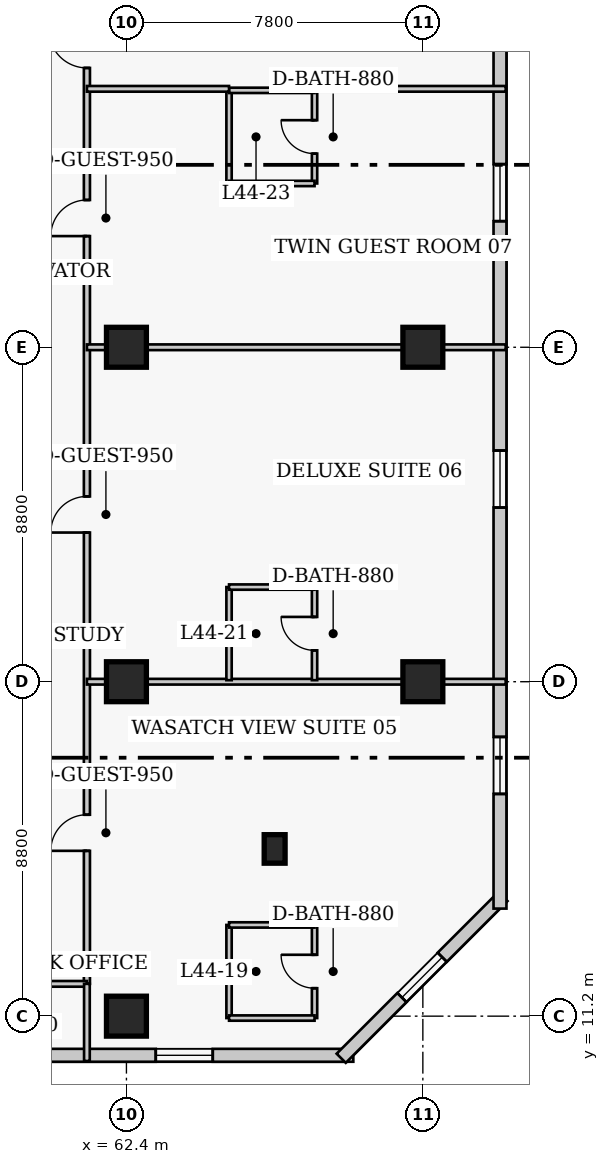
"""IFC4 building model, lengths in metres.
Left out: names, types, materials, properties, quantities, classifications, styles, units other than length and angle.
Written with IfcOpenShell. Run it as: python <this file> out.ifc"""

import sys

from ifc_helpers import new_model, si_unit, direction, frame, frame_2d, origin, origin_2d, place, context, subcontext, project, spatial, rectangle, extrude, element, fill, save


model = new_model("IFC4")
c1 = context("Model", 3, precision=1e-05, world=origin(), true_north=direction((0.0, 1.0)))
c2 = subcontext(c1, "Body", "Model", "MODEL_VIEW")
j1 = project(units=[si_unit("LENGTHUNIT", "METRE"), si_unit("PLANEANGLEUNIT", "RADIAN")], contexts=[c1])
p1 = place(None, origin())
s1 = spatial("IfcSite", under=j1, at=p1, CompositionType="ELEMENT")
p2 = place(p1, origin())
s2 = spatial("IfcBuilding", under=s1, at=p2, CompositionType="ELEMENT")
p3 = place(p2, frame((0.0, 0.0, 176.4)))
s3 = spatial("IfcBuildingStorey", under=s2, at=p3, CompositionType="ELEMENT", Elevation=176.4)
for number, where, z_axis, x_axis in (
    (1, (62.4, 11.2, 0.0), (0.0, 0.0, 1.0), (1.0, 0.0, 0.0)),
    (2, (62.4, 20.0, 0.0), (0.0, 0.0, 1.0), (1.0, 0.0, 0.0)),
    (3, (62.4, 28.8, 0.0), (0.0, 0.0, 1.0), (1.0, 0.0, 0.0)),
    (4, (70.2, 20.0, 0.0), (0.0, 0.0, 1.0), (1.0, 0.0, 0.0)),
    (5, (70.2, 28.8, 0.0), (0.0, 0.0, 1.0), (1.0, 0.0, 0.0)),
):
    element("IfcColumn", number, at=place(p3, frame(where, z_axis=z_axis, x_axis=x_axis)), inside=s3, PredefinedType="COLUMN", context=c2, shape_type="SweptSolid", body=[
        extrude(rectangle(XDim=1.05, YDim=1.05, at=origin_2d()), origin(), (0.0, 0.0, 1.0), 3.8),
    ])
p4 = place(p3, frame((66.3, 15.6, 0.0), z_axis=(0.0, 0.0, 1.0), x_axis=(1.0, 0.0, 0.0)))
e6 = element("IfcColumn", 6, at=p4, inside=s3, PredefinedType="PILASTER", context=c2, shape_type="SweptSolid", body=[
    extrude(rectangle(XDim=0.55, YDim=0.75, at=origin_2d()), origin(), (0.0, 0.0, 1.0), 3.8),
])
p5 = place(p3, frame((41.68, 10.17, 0.0), z_axis=(0.0, 0.0, 1.0), x_axis=(1.0, 0.0, 0.0)))
e7 = element("IfcWall", 7, at=p5, inside=s3, PredefinedType="SOLIDWALL", context=c2, shape_type="SweptSolid", body=[
    extrude(rectangle(XDim=26.69, YDim=0.34, at=frame_2d((13.345, 0.0))), origin(), (0.0, 0.0, 1.0), 3.55),
])
p6 = place(p5, frame((2.548, 0.0, 0.85)))
e8 = element("IfcOpeningElement", 8, at=p6, cuts=e7, PredefinedType="OPENING", context=c2, shape_type="SweptSolid", body=[
    extrude(rectangle(XDim=1.5, YDim=1.75, at=frame_2d((0.75, 0.875))), frame((0.0, 0.18, 0.0), z_axis=(0.0, -1.0, 0.0), x_axis=(1.0, 0.0, 0.0)), (0.0, 0.0, 1.0), 0.36),
])
p7 = place(p5, frame((13.745, 0.0, 0.85)))
e9 = element("IfcOpeningElement", 9, at=p7, cuts=e7, PredefinedType="OPENING", context=c2, shape_type="SweptSolid", body=[
    extrude(rectangle(XDim=1.5, YDim=1.75, at=frame_2d((0.75, 0.875))), frame((0.0, 0.18, 0.0), z_axis=(0.0, -1.0, 0.0), x_axis=(1.0, 0.0, 0.0)), (0.0, 0.0, 1.0), 0.36),
])
p8 = place(p5, frame((21.492, 0.0, 0.85)))
e10 = element("IfcOpeningElement", 10, at=p8, cuts=e7, PredefinedType="OPENING", context=c2, shape_type="SweptSolid", body=[
    extrude(rectangle(XDim=1.5, YDim=1.75, at=frame_2d((0.75, 0.875))), frame((0.0, 0.18, 0.0), z_axis=(0.0, -1.0, 0.0), x_axis=(1.0, 0.0, 0.0)), (0.0, 0.0, 1.0), 0.36),
])
p9 = place(p3, frame((68.052, 10.092, 0.0), z_axis=(0.0, 0.0, 1.0), x_axis=(0.707106781187, 0.707106781187, 0.0)))
e11 = element("IfcWall", 11, at=p9, inside=s3, PredefinedType="SOLIDWALL", context=c2, shape_type="SweptSolid", body=[
    extrude(rectangle(XDim=6.02, YDim=0.34, at=frame_2d((3.01, 0.0))), origin(), (0.0, 0.0, 1.0), 3.55),
])
p10 = place(p9, frame((2.26, 0.0, 0.85)))
e12 = element("IfcOpeningElement", 12, at=p10, cuts=e11, PredefinedType="OPENING", context=c2, shape_type="SweptSolid", body=[
    extrude(rectangle(XDim=1.5, YDim=1.75, at=frame_2d((0.75, 0.875))), frame((0.0, 0.18, 0.0), z_axis=(0.0, -1.0, 0.0), x_axis=(1.0, 0.0, 0.0)), (0.0, 0.0, 1.0), 0.36),
])
p11 = place(p3, frame((72.23, 14.03, 0.0), z_axis=(0.0, 0.0, 1.0), x_axis=(0.0, 1.0, 0.0)))
e13 = element("IfcWall", 13, at=p11, inside=s3, PredefinedType="SOLIDWALL", context=c2, shape_type="SweptSolid", body=[
    extrude(rectangle(XDim=30.14, YDim=0.34, at=frame_2d((15.07, 0.0))), origin(), (0.0, 0.0, 1.0), 3.55),
])
p12 = place(p11, frame((3.018, 0.0, 0.85)))
e14 = element("IfcOpeningElement", 14, at=p12, cuts=e13, PredefinedType="OPENING", context=c2, shape_type="SweptSolid", body=[
    extrude(rectangle(XDim=1.5, YDim=1.75, at=frame_2d((0.75, 0.875))), frame((0.0, 0.18, 0.0), z_axis=(0.0, -1.0, 0.0), x_axis=(1.0, 0.0, 0.0)), (0.0, 0.0, 1.0), 0.36),
])
p13 = place(p11, frame((10.552, 0.0, 0.85)))
e15 = element("IfcOpeningElement", 15, at=p13, cuts=e13, PredefinedType="OPENING", context=c2, shape_type="SweptSolid", body=[
    extrude(rectangle(XDim=1.5, YDim=1.75, at=frame_2d((0.75, 0.875))), frame((0.0, 0.18, 0.0), z_axis=(0.0, -1.0, 0.0), x_axis=(1.0, 0.0, 0.0)), (0.0, 0.0, 1.0), 0.36),
])
p14 = place(p11, frame((18.087, 0.0, 0.85)))
e16 = element("IfcOpeningElement", 16, at=p14, cuts=e13, PredefinedType="OPENING", context=c2, shape_type="SweptSolid", body=[
    extrude(rectangle(XDim=1.5, YDim=1.75, at=frame_2d((0.75, 0.875))), frame((0.0, 0.18, 0.0), z_axis=(0.0, -1.0, 0.0), x_axis=(1.0, 0.0, 0.0)), (0.0, 0.0, 1.0), 0.36),
])
p15 = place(p11, frame((25.623, 0.0, 0.85)))
e17 = element("IfcOpeningElement", 17, at=p15, cuts=e13, PredefinedType="OPENING", context=c2, shape_type="SweptSolid", body=[
    extrude(rectangle(XDim=1.5, YDim=1.75, at=frame_2d((0.75, 0.875))), frame((0.0, 0.18, 0.0), z_axis=(0.0, -1.0, 0.0), x_axis=(1.0, 0.0, 0.0)), (0.0, 0.0, 1.0), 0.36),
])
p16 = place(p3, frame((61.36, 12.05, 0.0), z_axis=(0.0, 0.0, 1.0), x_axis=(0.0, 1.0, 0.0)))
e18 = element("IfcWall", 18, at=p16, inside=s3, PredefinedType="PARTITIONING", context=c2, shape_type="SweptSolid", body=[
    extrude(rectangle(XDim=28.6, YDim=0.16, at=frame_2d((14.3, 0.0))), origin(), (0.0, 0.0, 1.0), 3.55),
])
p17 = place(p16, frame((3.5, 0.0, 0.0)))
e19 = element("IfcOpeningElement", 19, at=p17, cuts=e18, PredefinedType="OPENING", context=c2, shape_type="SweptSolid", body=[
    extrude(rectangle(XDim=0.95, YDim=2.1, at=frame_2d((0.475, 1.05))), frame((0.0, 0.09, 0.0), z_axis=(0.0, -1.0, 0.0), x_axis=(1.0, 0.0, 0.0)), (0.0, 0.0, 1.0), 0.18),
])
p18 = place(p16, frame((11.875, 0.0, 0.0)))
e20 = element("IfcOpeningElement", 20, at=p18, cuts=e18, PredefinedType="OPENING", context=c2, shape_type="SweptSolid", body=[
    extrude(rectangle(XDim=0.95, YDim=2.1, at=frame_2d((0.475, 1.05))), frame((0.0, 0.09, 0.0), z_axis=(0.0, -1.0, 0.0), x_axis=(1.0, 0.0, 0.0)), (0.0, 0.0, 1.0), 0.18),
])
p19 = place(p16, frame((19.675, 0.0, 0.0)))
e21 = element("IfcOpeningElement", 21, at=p19, cuts=e18, PredefinedType="OPENING", context=c2, shape_type="SweptSolid", body=[
    extrude(rectangle(XDim=0.95, YDim=2.1, at=frame_2d((0.475, 1.05))), frame((0.0, 0.09, 0.0), z_axis=(0.0, -1.0, 0.0), x_axis=(1.0, 0.0, 0.0)), (0.0, 0.0, 1.0), 0.18),
])
p20 = place(p16, frame((24.1, 0.0, 0.0)))
e22 = element("IfcOpeningElement", 22, at=p20, cuts=e18, PredefinedType="OPENING", context=c2, shape_type="SweptSolid", body=[
    extrude(rectangle(XDim=1.0, YDim=2.15, at=frame_2d((0.5, 1.075))), frame((0.0, 0.09, 0.0), z_axis=(0.0, -1.0, 0.0), x_axis=(1.0, 0.0, 0.0)), (0.0, 0.0, 1.0), 0.18),
])
p21 = place(p3, frame((59.14, 12.05, 0.0), z_axis=(0.0, 0.0, 1.0), x_axis=(1.0, 0.0, 0.0)))
e23 = element("IfcWall", 23, at=p21, inside=s3, PredefinedType="PARTITIONING", context=c2, shape_type="SweptSolid", body=[
    extrude(rectangle(XDim=2.22, YDim=0.15, at=frame_2d((1.11, 0.0))), origin(), (0.0, 0.0, 1.0), 3.55),
])
p22 = place(p3, frame((61.36, 10.02, 0.0), z_axis=(0.0, 0.0, 1.0), x_axis=(0.0, 1.0, 0.0)))
e24 = element("IfcWall", 24, at=p22, inside=s3, PredefinedType="PARTITIONING", context=c2, shape_type="SweptSolid", body=[
    extrude(rectangle(XDim=2.03, YDim=0.15, at=frame_2d((1.015, 0.0))), origin(), (0.0, 0.0, 1.0), 3.55),
])
p23 = place(p3, frame((65.1, 11.15, 0.0), z_axis=(0.0, 0.0, 1.0), x_axis=(0.0, 1.0, 0.0)))
e25 = element("IfcWall", 25, at=p23, inside=s3, PredefinedType="PLUMBINGWALL", context=c2, shape_type="SweptSolid", body=[
    extrude(rectangle(XDim=2.45, YDim=0.14, at=frame_2d((1.225, 0.0))), origin(), (0.0, 0.0, 1.0), 3.55),
])
p24 = place(p3, frame((67.35, 11.15, 0.0), z_axis=(0.0, 0.0, 1.0), x_axis=(0.0, 1.0, 0.0)))
e26 = element("IfcWall", 26, at=p24, inside=s3, PredefinedType="PLUMBINGWALL", context=c2, shape_type="SweptSolid", body=[
    extrude(rectangle(XDim=2.45, YDim=0.14, at=frame_2d((1.225, 0.0))), origin(), (0.0, 0.0, 1.0), 3.55),
])
p25 = place(p24, frame((0.785, 0.0, 0.0)))
e27 = element("IfcOpeningElement", 27, at=p25, cuts=e26, PredefinedType="OPENING", context=c2, shape_type="SweptSolid", body=[
    extrude(rectangle(XDim=0.88, YDim=2.05, at=frame_2d((0.44, 1.025))), frame((0.0, 0.08, 0.0), z_axis=(0.0, -1.0, 0.0), x_axis=(1.0, 0.0, 0.0)), (0.0, 0.0, 1.0), 0.16),
])
for number, where, z_axis, x_axis in (
    (28, (65.1, 11.15, 0.0), (0.0, 0.0, 1.0), (1.0, 0.0, 0.0)),
    (29, (65.1, 13.6, 0.0), (0.0, 0.0, 1.0), (1.0, 0.0, 0.0)),
):
    element("IfcWall", number, at=place(p3, frame(where, z_axis=z_axis, x_axis=x_axis)), inside=s3, PredefinedType="PLUMBINGWALL", context=c2, shape_type="SweptSolid", body=[
        extrude(rectangle(XDim=2.25, YDim=0.14, at=frame_2d((1.125, 0.0))), origin(), (0.0, 0.0, 1.0), 3.55),
    ])
p26 = place(p3, frame((61.36, 20.0, 0.0), z_axis=(0.0, 0.0, 1.0), x_axis=(1.0, 0.0, 0.0)))
e30 = element("IfcWall", 30, at=p26, inside=s3, PredefinedType="PARTITIONING", context=c2, shape_type="SweptSolid", body=[
    extrude(rectangle(XDim=11.02, YDim=0.15, at=frame_2d((5.51, 0.0))), origin(), (0.0, 0.0, 1.0), 2.778),
])
p27 = place(p3, frame((65.1, 20.04, 0.0), z_axis=(0.0, 0.0, 1.0), x_axis=(0.0, 1.0, 0.0)))
e31 = element("IfcWall", 31, at=p27, inside=s3, PredefinedType="PLUMBINGWALL", context=c2, shape_type="SweptSolid", body=[
    extrude(rectangle(XDim=2.45, YDim=0.14, at=frame_2d((1.225, 0.0))), origin(), (0.0, 0.0, 1.0), 3.55),
])
p28 = place(p3, frame((67.35, 20.04, 0.0), z_axis=(0.0, 0.0, 1.0), x_axis=(0.0, 1.0, 0.0)))
e32 = element("IfcWall", 32, at=p28, inside=s3, PredefinedType="PLUMBINGWALL", context=c2, shape_type="SweptSolid", body=[
    extrude(rectangle(XDim=2.45, YDim=0.14, at=frame_2d((1.225, 0.0))), origin(), (0.0, 0.0, 1.0), 3.55),
])
p29 = place(p28, frame((0.785, 0.0, 0.0)))
e33 = element("IfcOpeningElement", 33, at=p29, cuts=e32, PredefinedType="OPENING", context=c2, shape_type="SweptSolid", body=[
    extrude(rectangle(XDim=0.88, YDim=2.05, at=frame_2d((0.44, 1.025))), frame((0.0, 0.08, 0.0), z_axis=(0.0, -1.0, 0.0), x_axis=(1.0, 0.0, 0.0)), (0.0, 0.0, 1.0), 0.16),
])
p30 = place(p3, frame((65.1, 22.49, 0.0), z_axis=(0.0, 0.0, 1.0), x_axis=(1.0, 0.0, 0.0)))
e34 = element("IfcWall", 34, at=p30, inside=s3, PredefinedType="PLUMBINGWALL", context=c2, shape_type="SweptSolid", body=[
    extrude(rectangle(XDim=2.25, YDim=0.14, at=frame_2d((1.125, 0.0))), origin(), (0.0, 0.0, 1.0), 3.55),
])
p31 = place(p3, frame((61.36, 28.8, 0.0), z_axis=(0.0, 0.0, 1.0), x_axis=(1.0, 0.0, 0.0)))
e35 = element("IfcWall", 35, at=p31, inside=s3, PredefinedType="PARTITIONING", context=c2, shape_type="SweptSolid", body=[
    extrude(rectangle(XDim=11.02, YDim=0.15, at=frame_2d((5.51, 0.0))), origin(), (0.0, 0.0, 1.0), 2.778),
])
p32 = place(p3, frame((65.1, 33.11, 0.0), z_axis=(0.0, 0.0, 1.0), x_axis=(0.0, 1.0, 0.0)))
e36 = element("IfcWall", 36, at=p32, inside=s3, PredefinedType="PLUMBINGWALL", context=c2, shape_type="SweptSolid", body=[
    extrude(rectangle(XDim=2.45, YDim=0.14, at=frame_2d((1.225, 0.0))), origin(), (0.0, 0.0, 1.0), 3.55),
])
p33 = place(p3, frame((67.35, 33.11, 0.0), z_axis=(0.0, 0.0, 1.0), x_axis=(0.0, 1.0, 0.0)))
e37 = element("IfcWall", 37, at=p33, inside=s3, PredefinedType="PLUMBINGWALL", context=c2, shape_type="SweptSolid", body=[
    extrude(rectangle(XDim=2.45, YDim=0.14, at=frame_2d((1.225, 0.0))), origin(), (0.0, 0.0, 1.0), 3.55),
])
p34 = place(p33, frame((0.785, 0.0, 0.0)))
e38 = element("IfcOpeningElement", 38, at=p34, cuts=e37, PredefinedType="OPENING", context=c2, shape_type="SweptSolid", body=[
    extrude(rectangle(XDim=0.88, YDim=2.05, at=frame_2d((0.44, 1.025))), frame((0.0, 0.08, 0.0), z_axis=(0.0, -1.0, 0.0), x_axis=(1.0, 0.0, 0.0)), (0.0, 0.0, 1.0), 0.16),
])
for number, where, z_axis, x_axis in (
    (39, (65.1, 33.11, 0.0), (0.0, 0.0, 1.0), (1.0, 0.0, 0.0)),
    (40, (65.1, 35.56, 0.0), (0.0, 0.0, 1.0), (1.0, 0.0, 0.0)),
):
    element("IfcWall", number, at=place(p3, frame(where, z_axis=z_axis, x_axis=x_axis)), inside=s3, PredefinedType="PLUMBINGWALL", context=c2, shape_type="SweptSolid", body=[
        extrude(rectangle(XDim=2.25, YDim=0.14, at=frame_2d((1.125, 0.0))), origin(), (0.0, 0.0, 1.0), 3.55),
    ])
p35 = place(p3, frame((61.36, 35.6, 0.0), z_axis=(0.0, 0.0, 1.0), x_axis=(1.0, 0.0, 0.0)))
e41 = element("IfcWall", 41, at=p35, inside=s3, PredefinedType="PARTITIONING", context=c2, shape_type="SweptSolid", body=[
    extrude(rectangle(XDim=3.74, YDim=0.15, at=frame_2d((1.87, 0.0))), origin(), (0.0, 0.0, 1.0), 3.55),
])
p36 = place(p3, frame((67.35, 35.6, 0.0), z_axis=(0.0, 0.0, 1.0), x_axis=(1.0, 0.0, 0.0)))
e42 = element("IfcWall", 42, at=p36, inside=s3, PredefinedType="PARTITIONING", context=c2, shape_type="SweptSolid", body=[
    extrude(rectangle(XDim=5.03, YDim=0.15, at=frame_2d((2.515, 0.0))), origin(), (0.0, 0.0, 1.0), 3.55),
])
p37 = place(p8, origin())
e43 = element("IfcWindow", 43, at=p37, inside=s3, PartitioningType="SINGLE_PANEL", PredefinedType="WINDOW", context=c2, shape_type="SweptSolid", body=[
    extrude(rectangle(XDim=1.5, YDim=1.75, at=frame_2d((0.75, 0.875))), frame((0.0, 0.03, 0.0), z_axis=(0.0, -1.0, 0.0), x_axis=(1.0, 0.0, 0.0)), (0.0, 0.0, 1.0), 0.06),
])
fill(e10, e43)
p38 = place(p10, origin())
e44 = element("IfcWindow", 44, at=p38, inside=s3, PartitioningType="SINGLE_PANEL", PredefinedType="WINDOW", context=c2, shape_type="SweptSolid", body=[
    extrude(rectangle(XDim=1.5, YDim=1.75, at=frame_2d((0.75, 0.875))), frame((0.0, 0.03, 0.0), z_axis=(0.0, -1.0, 0.0), x_axis=(1.0, 0.0, 0.0)), (0.0, 0.0, 1.0), 0.06),
])
fill(e12, e44)
p39 = place(p12, origin())
e45 = element("IfcWindow", 45, at=p39, inside=s3, PartitioningType="SINGLE_PANEL", PredefinedType="WINDOW", context=c2, shape_type="SweptSolid", body=[
    extrude(rectangle(XDim=1.5, YDim=1.75, at=frame_2d((0.75, 0.875))), frame((0.0, 0.03, 0.0), z_axis=(0.0, -1.0, 0.0), x_axis=(1.0, 0.0, 0.0)), (0.0, 0.0, 1.0), 0.06),
])
fill(e14, e45)
p40 = place(p13, origin())
e46 = element("IfcWindow", 46, at=p40, inside=s3, PartitioningType="SINGLE_PANEL", PredefinedType="WINDOW", context=c2, shape_type="SweptSolid", body=[
    extrude(rectangle(XDim=1.5, YDim=1.75, at=frame_2d((0.75, 0.875))), frame((0.0, 0.03, 0.0), z_axis=(0.0, -1.0, 0.0), x_axis=(1.0, 0.0, 0.0)), (0.0, 0.0, 1.0), 0.06),
])
fill(e15, e46)
p41 = place(p14, origin())
e47 = element("IfcWindow", 47, at=p41, inside=s3, PartitioningType="SINGLE_PANEL", PredefinedType="WINDOW", context=c2, shape_type="SweptSolid", body=[
    extrude(rectangle(XDim=1.5, YDim=1.75, at=frame_2d((0.75, 0.875))), frame((0.0, 0.03, 0.0), z_axis=(0.0, -1.0, 0.0), x_axis=(1.0, 0.0, 0.0)), (0.0, 0.0, 1.0), 0.06),
])
fill(e16, e47)
p42 = place(p25, origin())
e48 = element("IfcDoor", 48, at=p42, inside=s3, OperationType="SINGLE_SWING_RIGHT", PredefinedType="DOOR", context=c2, shape_type="SweptSolid", body=[
    extrude(rectangle(XDim=0.88, YDim=2.05, at=frame_2d((0.44, 1.025))), frame((0.0, 0.025, 0.0), z_axis=(0.0, -1.0, 0.0), x_axis=(1.0, 0.0, 0.0)), (0.0, 0.0, 1.0), 0.05),
])
fill(e27, e48)
p43 = place(p17, origin())
e49 = element("IfcDoor", 49, at=p43, inside=s3, OperationType="SINGLE_SWING_LEFT", PredefinedType="DOOR", context=c2, shape_type="SweptSolid", body=[
    extrude(rectangle(XDim=0.95, YDim=2.1, at=frame_2d((0.475, 1.05))), frame((0.0, 0.025, 0.0), z_axis=(0.0, -1.0, 0.0), x_axis=(1.0, 0.0, 0.0)), (0.0, 0.0, 1.0), 0.05),
])
fill(e19, e49)
p44 = place(p29, origin())
e50 = element("IfcDoor", 50, at=p44, inside=s3, OperationType="SINGLE_SWING_RIGHT", PredefinedType="DOOR", context=c2, shape_type="SweptSolid", body=[
    extrude(rectangle(XDim=0.88, YDim=2.05, at=frame_2d((0.44, 1.025))), frame((0.0, 0.025, 0.0), z_axis=(0.0, -1.0, 0.0), x_axis=(1.0, 0.0, 0.0)), (0.0, 0.0, 1.0), 0.05),
])
fill(e33, e50)
p45 = place(p18, origin())
e51 = element("IfcDoor", 51, at=p45, inside=s3, OperationType="SINGLE_SWING_LEFT", PredefinedType="DOOR", context=c2, shape_type="SweptSolid", body=[
    extrude(rectangle(XDim=0.95, YDim=2.1, at=frame_2d((0.475, 1.05))), frame((0.0, 0.025, 0.0), z_axis=(0.0, -1.0, 0.0), x_axis=(1.0, 0.0, 0.0)), (0.0, 0.0, 1.0), 0.05),
])
fill(e20, e51)
p46 = place(p34, origin())
e52 = element("IfcDoor", 52, at=p46, inside=s3, OperationType="SINGLE_SWING_RIGHT", PredefinedType="DOOR", context=c2, shape_type="SweptSolid", body=[
    extrude(rectangle(XDim=0.88, YDim=2.05, at=frame_2d((0.44, 1.025))), frame((0.0, 0.025, 0.0), z_axis=(0.0, -1.0, 0.0), x_axis=(1.0, 0.0, 0.0)), (0.0, 0.0, 1.0), 0.05),
])
fill(e38, e52)
p47 = place(p19, origin())
e53 = element("IfcDoor", 53, at=p47, inside=s3, OperationType="SINGLE_SWING_LEFT", PredefinedType="DOOR", context=c2, shape_type="SweptSolid", body=[
    extrude(rectangle(XDim=0.95, YDim=2.1, at=frame_2d((0.475, 1.05))), frame((0.0, 0.025, 0.0), z_axis=(0.0, -1.0, 0.0), x_axis=(1.0, 0.0, 0.0)), (0.0, 0.0, 1.0), 0.05),
])
fill(e21, e53)
p48 = place(p20, origin())
e54 = element("IfcDoor", 54, at=p48, inside=s3, OperationType="SINGLE_SWING_RIGHT", PredefinedType="DOOR", context=c2, shape_type="SweptSolid", body=[
    extrude(rectangle(XDim=1.0, YDim=2.15, at=frame_2d((0.5, 1.075))), frame((0.0, 0.025, 0.0), z_axis=(0.0, -1.0, 0.0), x_axis=(1.0, 0.0, 0.0)), (0.0, 0.0, 1.0), 0.05),
])
fill(e22, e54)
save(model, sys.argv[1])
